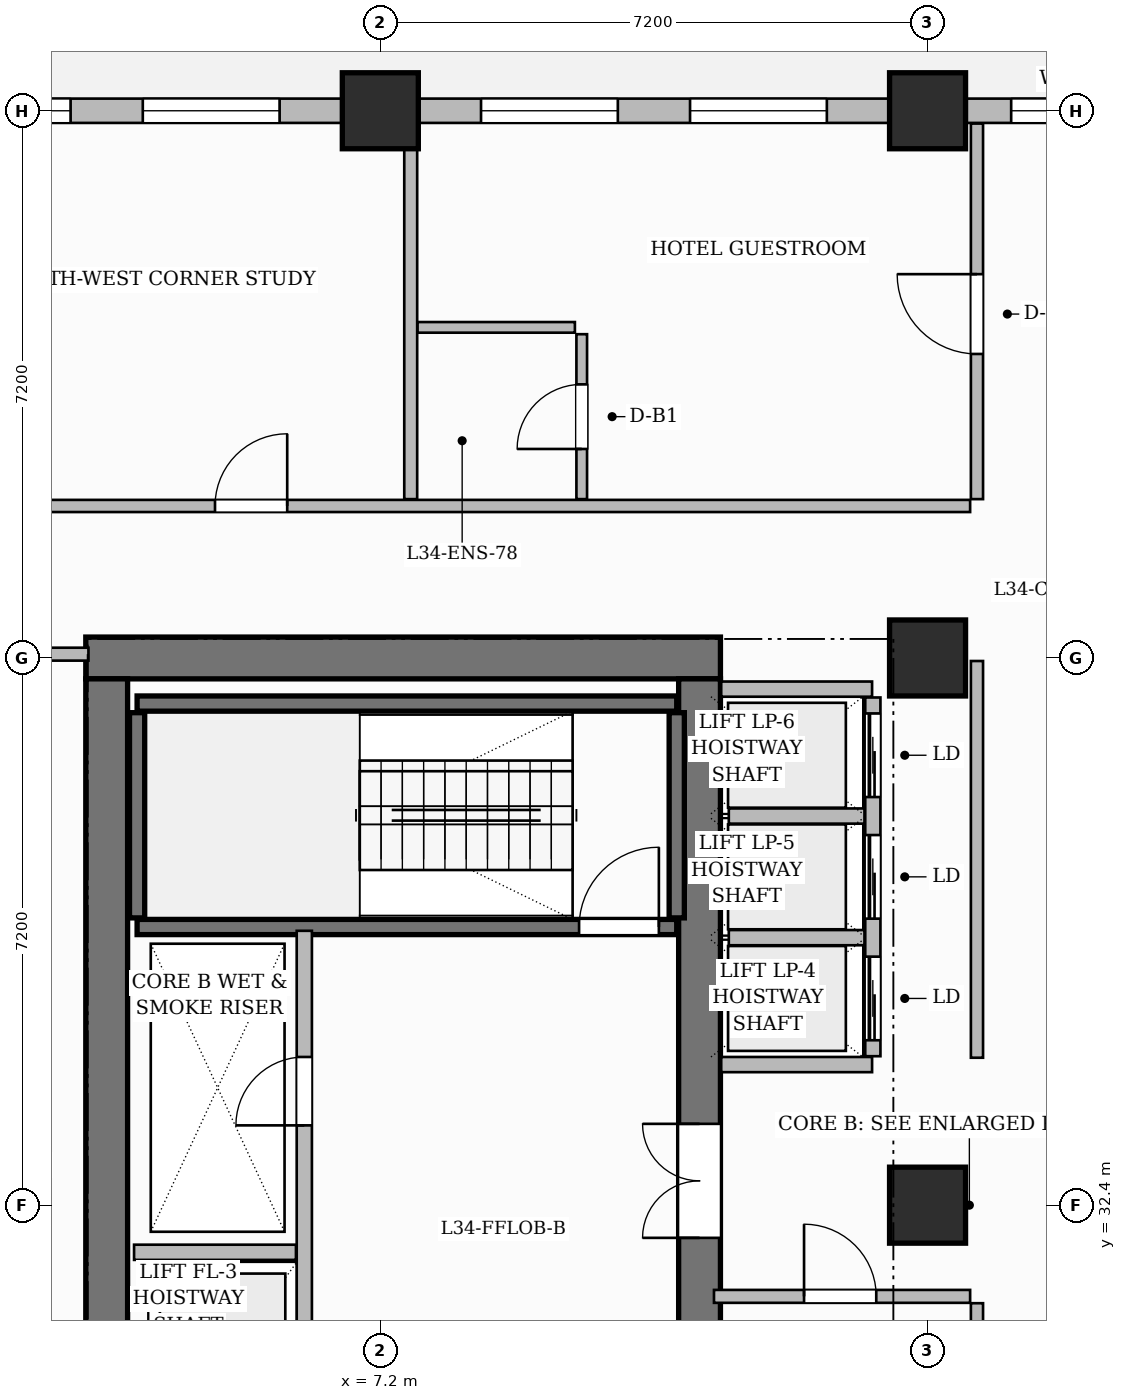
"""IFC4 building model, lengths in metres.
Left out: names, types, materials, properties, quantities, classifications, styles, units other than length and angle.
Written with IfcOpenShell. Run it as: python <this file> out.ifc"""

import sys

from ifc_helpers import new_model, si_unit, direction, frame, frame_2d, origin, origin_2d, place, context, subcontext, project, spatial, rectangle, extrude, source, transform, mapped, element, fill, save


model = new_model("IFC4")
c1 = context("Model", 3, precision=1e-05, world=origin(), true_north=direction((0.0, 1.0)))
c2 = subcontext(c1, "Body", "Model", "MODEL_VIEW")
j1 = project(units=[si_unit("LENGTHUNIT", "METRE"), si_unit("PLANEANGLEUNIT", "RADIAN")], contexts=[c1])
p1 = place(None, origin())
s1 = spatial("IfcSite", under=j1, at=p1, CompositionType="ELEMENT")
p2 = place(p1, origin())
s2 = spatial("IfcBuilding", under=s1, at=p2, CompositionType="ELEMENT")
p3 = place(p2, frame((0.0, 0.0, 137.7)))
s3 = spatial("IfcBuildingStorey", under=s2, at=p3, CompositionType="ELEMENT", Elevation=137.7)
p4 = place(p3, frame((3.325, 39.6, 0.0), z_axis=(0.0, 0.0, 1.0), x_axis=(1.0, 0.0, 0.0)))
e1 = element("IfcWall", 1, at=p4, inside=s3, PredefinedType="SHEAR", context=c2, shape_type="SweptSolid", body=[
    extrude(rectangle(XDim=8.35, YDim=0.55, at=frame_2d((4.175, 0.0))), origin(), (0.0, 0.0, 1.0), 3.7),
])
p5 = place(p3, frame((3.6, 25.475, 0.0), z_axis=(0.0, 0.0, 1.0), x_axis=(0.0, 1.0, 0.0)))
e2 = element("IfcWall", 2, at=p5, inside=s3, PredefinedType="SHEAR", context=c2, shape_type="SweptSolid", body=[
    extrude(rectangle(XDim=13.85, YDim=0.55, at=frame_2d((6.925, 0.0))), origin(), (0.0, 0.0, 1.0), 3.7),
])
p6 = place(p3, frame((11.4, 25.475, 0.0), z_axis=(0.0, 0.0, 1.0), x_axis=(0.0, 1.0, 0.0)))
e3 = element("IfcWall", 3, at=p6, inside=s3, PredefinedType="SHEAR", context=c2, shape_type="SweptSolid", body=[
    extrude(rectangle(XDim=13.85, YDim=0.55, at=frame_2d((6.925, 0.0))), origin(), (0.0, 0.0, 1.0), 3.7),
])
p7 = place(p6, frame((6.495, 0.0, 0.0)))
e4 = element("IfcOpeningElement", 4, at=p7, cuts=e3, PredefinedType="OPENING", context=c2, shape_type="SweptSolid", body=[
    extrude(rectangle(XDim=1.5, YDim=2.2, at=frame_2d((0.75, 1.1))), frame((0.0, 0.285, 0.0), z_axis=(0.0, -1.0, 0.0), x_axis=(1.0, 0.0, 0.0)), (0.0, 0.0, 1.0), 0.57),
])
m1 = source(origin(), c2, "Body", "SweptSolid", [
    extrude(rectangle(XDim=1.0, YDim=1.0, at=origin_2d()), origin(), (0.0, 0.0, 1.0), 3.7),
])
for number, where, z_axis, x_axis in (
    (5, (7.2, 46.8, 0.0), (0.0, 0.0, 1.0), (1.0, 0.0, 0.0)),
    (6, (14.4, 32.4, 0.0), (0.0, 0.0, 1.0), (1.0, 0.0, 0.0)),
    (7, (14.4, 39.6, 0.0), (0.0, 0.0, 1.0), (1.0, 0.0, 0.0)),
    (8, (14.4, 46.8, 0.0), (0.0, 0.0, 1.0), (1.0, 0.0, 0.0)),
):
    element("IfcColumn", number, at=place(p3, frame(where, z_axis=z_axis, x_axis=x_axis)), inside=s3, PredefinedType="COLUMN", context=c2, shape_type="MappedRepresentation", body=[
        mapped(m1, transform((0.0, 0.0, 0.0), scale=1.0)),
    ])
p8 = place(p3, frame((4.0, 39.0, 0.0), z_axis=(0.0, 0.0, 1.0), x_axis=(1.0, 0.0, 0.0)))
e9 = element("IfcWall", 9, at=p8, inside=s3, PredefinedType="SHEAR", context=c2, shape_type="SweptSolid", body=[
    extrude(rectangle(XDim=7.1, YDim=0.2, at=frame_2d((3.55, 0.0))), origin(), (0.0, 0.0, 1.0), 3.7),
])
for number, where, z_axis, x_axis in (
    (10, (4.0, 36.18, 0.0), (0.0, 0.0, 1.0), (0.0, 1.0, 0.0)),
    (11, (11.1, 36.18, 0.0), (0.0, 0.0, 1.0), (0.0, 1.0, 0.0)),
):
    element("IfcWall", number, at=place(p3, frame(where, z_axis=z_axis, x_axis=x_axis)), inside=s3, PredefinedType="SHEAR", context=c2, shape_type="SweptSolid", body=[
        extrude(rectangle(XDim=2.7, YDim=0.2, at=frame_2d((1.35, 0.0))), origin(), (0.0, 0.0, 1.0), 3.7),
    ])
p9 = place(p3, frame((4.0, 36.06, 0.0), z_axis=(0.0, 0.0, 1.0), x_axis=(1.0, 0.0, 0.0)))
e12 = element("IfcWall", 12, at=p9, inside=s3, PredefinedType="SHEAR", context=c2, shape_type="SweptSolid", body=[
    extrude(rectangle(XDim=7.1, YDim=0.2, at=frame_2d((3.55, 0.0))), origin(), (0.0, 0.0, 1.0), 3.7),
])
p10 = place(p9, frame((5.815, 0.0, 0.0)))
e13 = element("IfcOpeningElement", 13, at=p10, cuts=e12, PredefinedType="OPENING", context=c2, shape_type="SweptSolid", body=[
    extrude(rectangle(XDim=1.05, YDim=2.2, at=frame_2d((0.525, 1.1))), frame((0.0, 0.11, 0.0), z_axis=(0.0, -1.0, 0.0), x_axis=(1.0, 0.0, 0.0)), (0.0, 0.0, 1.0), 0.22),
])
p11 = place(p3, frame((6.2, 28.79, 0.0), z_axis=(0.0, 0.0, 1.0), x_axis=(0.0, 1.0, 0.0)))
e14 = element("IfcWall", 14, at=p11, inside=s3, PredefinedType="PARTITIONING", context=c2, shape_type="SweptSolid", body=[
    extrude(rectangle(XDim=7.22, YDim=0.2, at=frame_2d((3.61, 0.0))), origin(), (0.0, 0.0, 1.0), 3.45),
])
p12 = place(p11, frame((4.66, 0.0, 0.0)))
e15 = element("IfcOpeningElement", 15, at=p12, cuts=e14, PredefinedType="OPENING", context=c2, shape_type="SweptSolid", body=[
    extrude(rectangle(XDim=0.9, YDim=2.1, at=frame_2d((0.45, 1.05))), frame((0.0, 0.11, 0.0), z_axis=(0.0, -1.0, 0.0), x_axis=(1.0, 0.0, 0.0)), (0.0, 0.0, 1.0), 0.22),
])
p13 = place(p11, frame((0.96, 0.0, 0.0)))
e16 = element("IfcOpeningElement", 16, at=p13, cuts=e14, PredefinedType="OPENING", context=c2, shape_type="SweptSolid", body=[
    extrude(rectangle(XDim=1.1, YDim=2.2, at=frame_2d((0.55, 1.1))), frame((0.0, 0.11, 0.0), z_axis=(0.0, -1.0, 0.0), x_axis=(1.0, 0.0, 0.0)), (0.0, 0.0, 1.0), 0.22),
])
p14 = place(p3, frame((3.96, 31.78, 0.0), z_axis=(0.0, 0.0, 1.0), x_axis=(1.0, 0.0, 0.0)))
e17 = element("IfcWall", 17, at=p14, inside=s3, PredefinedType="PARTITIONING", context=c2, shape_type="SweptSolid", body=[
    extrude(rectangle(XDim=2.13, YDim=0.2, at=frame_2d((1.065, 0.0))), origin(), (0.0, 0.0, 1.0), 3.45),
])
for number, where, z_axis, x_axis in (
    (18, (11.685, 34.25, 0.0), (0.0, 0.0, 1.0), (1.0, 0.0, 0.0)),
    (19, (11.685, 39.19, 0.0), (0.0, 0.0, 1.0), (1.0, 0.0, 0.0)),
):
    element("IfcWall", number, at=place(p3, frame(where, z_axis=z_axis, x_axis=x_axis)), inside=s3, PredefinedType="PARTITIONING", context=c2, shape_type="SweptSolid", body=[
        extrude(rectangle(XDim=1.985, YDim=0.2, at=frame_2d((0.992, 0.0))), origin(), (0.0, 0.0, 1.0), 3.45),
    ])
p15 = place(p3, frame((13.68, 34.36, 0.0), z_axis=(0.0, 0.0, 1.0), x_axis=(0.0, 1.0, 0.0)))
e20 = element("IfcWall", 20, at=p15, inside=s3, PredefinedType="PARTITIONING", context=c2, shape_type="SweptSolid", body=[
    extrude(rectangle(XDim=4.72, YDim=0.2, at=frame_2d((2.36, 0.0))), origin(), (0.0, 0.0, 1.0), 3.45),
])
p16 = place(p15, frame((0.21, 0.0, 0.0)))
e21 = element("IfcOpeningElement", 21, at=p16, cuts=e20, PredefinedType="OPENING", context=c2, shape_type="SweptSolid", body=[
    extrude(rectangle(XDim=1.1, YDim=2.2, at=frame_2d((0.55, 1.1))), frame((0.0, 0.11, 0.0), z_axis=(0.0, -1.0, 0.0), x_axis=(1.0, 0.0, 0.0)), (0.0, 0.0, 1.0), 0.22),
])
p17 = place(p15, frame((1.81, 0.0, 0.0)))
e22 = element("IfcOpeningElement", 22, at=p17, cuts=e20, PredefinedType="OPENING", context=c2, shape_type="SweptSolid", body=[
    extrude(rectangle(XDim=1.1, YDim=2.2, at=frame_2d((0.55, 1.1))), frame((0.0, 0.11, 0.0), z_axis=(0.0, -1.0, 0.0), x_axis=(1.0, 0.0, 0.0)), (0.0, 0.0, 1.0), 0.22),
])
p18 = place(p15, frame((3.41, 0.0, 0.0)))
e23 = element("IfcOpeningElement", 23, at=p18, cuts=e20, PredefinedType="OPENING", context=c2, shape_type="SweptSolid", body=[
    extrude(rectangle(XDim=1.1, YDim=2.2, at=frame_2d((0.55, 1.1))), frame((0.0, 0.11, 0.0), z_axis=(0.0, -1.0, 0.0), x_axis=(1.0, 0.0, 0.0)), (0.0, 0.0, 1.0), 0.22),
])
for number, where, z_axis, x_axis in (
    (24, (11.785, 35.92, 0.0), (0.0, 0.0, 1.0), (1.0, 0.0, 0.0)),
    (25, (11.785, 37.52, 0.0), (0.0, 0.0, 1.0), (1.0, 0.0, 0.0)),
):
    element("IfcWall", number, at=place(p3, frame(where, z_axis=z_axis, x_axis=x_axis)), inside=s3, PredefinedType="PARTITIONING", context=c2, shape_type="SweptSolid", body=[
        extrude(rectangle(XDim=1.785, YDim=0.2, at=frame_2d((0.893, 0.0))), origin(), (0.0, 0.0, 1.0), 3.45),
    ])
p19 = place(p3, frame((0.24, 39.65, 0.0), z_axis=(0.0, 0.0, 1.0), x_axis=(1.0, 0.0, 0.0)))
e26 = element("IfcWall", 26, at=p19, inside=s3, PredefinedType="PARTITIONING", context=c2, shape_type="SweptSolid", body=[
    extrude(rectangle(XDim=3.12, YDim=0.17, at=frame_2d((1.56, 0.0))), origin(), (0.0, 0.0, 1.0), 3.45),
])
p20 = place(p19, frame((1.11, 0.0, 0.0)))
e27 = element("IfcOpeningElement", 27, at=p20, cuts=e26, PredefinedType="OPENING", context=c2, shape_type="SweptSolid", body=[
    extrude(rectangle(XDim=0.9, YDim=2.15, at=frame_2d((0.45, 1.075))), frame((0.0, 0.095, 0.0), z_axis=(0.0, -1.0, 0.0), x_axis=(1.0, 0.0, 0.0)), (0.0, 0.0, 1.0), 0.19),
])
p21 = place(p3, frame((15.05, 34.34, 0.0), z_axis=(0.0, 0.0, 1.0), x_axis=(0.0, 1.0, 0.0)))
e28 = element("IfcWall", 28, at=p21, inside=s3, PredefinedType="PARTITIONING", context=c2, shape_type="SweptSolid", body=[
    extrude(rectangle(XDim=5.22, YDim=0.16, at=frame_2d((2.61, 0.0))), origin(), (0.0, 0.0, 1.0), 3.45),
])
p22 = place(p3, frame((15.05, 41.69, 0.0), z_axis=(0.0, 0.0, 1.0), x_axis=(0.0, 1.0, 0.0)))
e29 = element("IfcWall", 29, at=p22, inside=s3, PredefinedType="PARTITIONING", context=c2, shape_type="SweptSolid", body=[
    extrude(rectangle(XDim=4.942, YDim=0.16, at=frame_2d((2.471, 0.0))), origin(), (0.0, 0.0, 1.0), 3.45),
])
p23 = place(p22, frame((1.91, 0.0, 0.0)))
e30 = element("IfcOpeningElement", 30, at=p23, cuts=e29, PredefinedType="OPENING", context=c2, shape_type="SweptSolid", body=[
    extrude(rectangle(XDim=1.05, YDim=2.25, at=frame_2d((0.525, 1.125))), frame((0.0, 0.09, 0.0), z_axis=(0.0, -1.0, 0.0), x_axis=(1.0, 0.0, 0.0)), (0.0, 0.0, 1.0), 0.18),
])
p24 = place(p3, frame((7.6, 41.69, 0.0), z_axis=(0.0, 0.0, 1.0), x_axis=(0.0, 1.0, 0.0)))
e31 = element("IfcWall", 31, at=p24, inside=s3, PredefinedType="PARTITIONING", context=c2, shape_type="SweptSolid", body=[
    extrude(rectangle(XDim=4.87, YDim=0.17, at=frame_2d((2.435, 0.0))), origin(), (0.0, 0.0, 1.0), 3.45),
])
p25 = place(p3, frame((0.168, 41.6, 0.0), z_axis=(0.0, 0.0, 1.0), x_axis=(1.0, 0.0, 0.0)))
e32 = element("IfcWall", 32, at=p25, inside=s3, PredefinedType="PARTITIONING", context=c2, shape_type="SweptSolid", body=[
    extrude(rectangle(XDim=14.792, YDim=0.16, at=frame_2d((7.396, 0.0))), origin(), (0.0, 0.0, 1.0), 2.935),
])
p26 = place(p25, frame((4.857, 0.0, 0.0)))
e33 = element("IfcOpeningElement", 33, at=p26, cuts=e32, PredefinedType="OPENING", context=c2, shape_type="SweptSolid", body=[
    extrude(rectangle(XDim=0.95, YDim=2.15, at=frame_2d((0.475, 1.075))), frame((0.0, 0.09, 0.0), z_axis=(0.0, -1.0, 0.0), x_axis=(1.0, 0.0, 0.0)), (0.0, 0.0, 1.0), 0.18),
])
p27 = place(p3, frame((7.69, 43.95, 0.0), z_axis=(0.0, 0.0, 1.0), x_axis=(1.0, 0.0, 0.0)))
e34 = element("IfcWall", 34, at=p27, inside=s3, PredefinedType="PARTITIONING", context=c2, shape_type="SweptSolid", body=[
    extrude(rectangle(XDim=2.07, YDim=0.14, at=frame_2d((1.035, 0.0))), origin(), (0.0, 0.0, 1.0), 2.935),
])
p28 = place(p3, frame((9.85, 41.69, 0.0), z_axis=(0.0, 0.0, 1.0), x_axis=(0.0, 1.0, 0.0)))
e35 = element("IfcWall", 35, at=p28, inside=s3, PredefinedType="PARTITIONING", context=c2, shape_type="SweptSolid", body=[
    extrude(rectangle(XDim=2.17, YDim=0.14, at=frame_2d((1.085, 0.0))), origin(), (0.0, 0.0, 1.0), 3.45),
])
p29 = place(p28, frame((0.66, 0.0, 0.0)))
e36 = element("IfcOpeningElement", 36, at=p29, cuts=e35, PredefinedType="OPENING", context=c2, shape_type="SweptSolid", body=[
    extrude(rectangle(XDim=0.85, YDim=2.1, at=frame_2d((0.425, 1.05))), frame((0.0, 0.08, 0.0), z_axis=(0.0, -1.0, 0.0), x_axis=(1.0, 0.0, 0.0)), (0.0, 0.0, 1.0), 0.16),
])
p30 = place(p3, frame((15.05, 25.39, 0.0), z_axis=(0.0, 0.0, 1.0), x_axis=(0.0, 1.0, 0.0)))
e37 = element("IfcWall", 37, at=p30, inside=s3, PredefinedType="PARTITIONING", context=c2, shape_type="SweptSolid", body=[
    extrude(rectangle(XDim=5.72, YDim=0.16, at=frame_2d((2.86, 0.0))), origin(), (0.0, 0.0, 1.0), 3.45),
])
p31 = place(p3, frame((11.59, 31.2, 0.0), z_axis=(0.0, 0.0, 1.0), x_axis=(1.0, 0.0, 0.0)))
e38 = element("IfcWall", 38, at=p31, inside=s3, PredefinedType="PARTITIONING", context=c2, shape_type="SweptSolid", body=[
    extrude(rectangle(XDim=3.37, YDim=0.17, at=frame_2d((1.685, 0.0))), origin(), (0.0, 0.0, 1.0), 3.45),
])
p32 = place(p31, frame((1.185, 0.0, 0.0)))
e39 = element("IfcOpeningElement", 39, at=p32, cuts=e38, PredefinedType="OPENING", context=c2, shape_type="SweptSolid", body=[
    extrude(rectangle(XDim=0.95, YDim=2.15, at=frame_2d((0.475, 1.075))), frame((0.0, 0.095, 0.0), z_axis=(0.0, -1.0, 0.0), x_axis=(1.0, 0.0, 0.0)), (0.0, 0.0, 1.0), 0.19),
])
p33 = place(p3, frame((0.0, 46.8, 0.0), z_axis=(0.0, 0.0, 1.0), x_axis=(1.0, 0.0, 0.0)))
e40 = element("IfcWall", 40, at=p33, inside=s3, PredefinedType="SOLIDWALL", context=c2, shape_type="SweptSolid", body=[
    extrude(rectangle(XDim=18.0, YDim=0.32, at=frame_2d((9.0, 0.0))), origin(), (0.0, 0.0, 1.0), 2.935),
])
p34 = place(p33, frame((1.325, 0.0, 0.8)))
e41 = element("IfcOpeningElement", 41, at=p34, cuts=e40, PredefinedType="OPENING", context=c2, shape_type="SweptSolid", body=[
    extrude(rectangle(XDim=1.8, YDim=1.85, at=frame_2d((0.9, 0.925))), frame((0.0, 0.17, 0.0), z_axis=(0.0, -1.0, 0.0), x_axis=(1.0, 0.0, 0.0)), (0.0, 0.0, 1.0), 0.34),
])
p35 = place(p33, frame((4.075, 0.0, 0.8)))
e42 = element("IfcOpeningElement", 42, at=p35, cuts=e40, PredefinedType="OPENING", context=c2, shape_type="SweptSolid", body=[
    extrude(rectangle(XDim=1.8, YDim=1.85, at=frame_2d((0.9, 0.925))), frame((0.0, 0.17, 0.0), z_axis=(0.0, -1.0, 0.0), x_axis=(1.0, 0.0, 0.0)), (0.0, 0.0, 1.0), 0.34),
])
p36 = place(p33, frame((8.525, 0.0, 0.8)))
e43 = element("IfcOpeningElement", 43, at=p36, cuts=e40, PredefinedType="OPENING", context=c2, shape_type="SweptSolid", body=[
    extrude(rectangle(XDim=1.8, YDim=1.85, at=frame_2d((0.9, 0.925))), frame((0.0, 0.17, 0.0), z_axis=(0.0, -1.0, 0.0), x_axis=(1.0, 0.0, 0.0)), (0.0, 0.0, 1.0), 0.34),
])
p37 = place(p33, frame((11.275, 0.0, 0.8)))
e44 = element("IfcOpeningElement", 44, at=p37, cuts=e40, PredefinedType="OPENING", context=c2, shape_type="SweptSolid", body=[
    extrude(rectangle(XDim=1.8, YDim=1.85, at=frame_2d((0.9, 0.925))), frame((0.0, 0.17, 0.0), z_axis=(0.0, -1.0, 0.0), x_axis=(1.0, 0.0, 0.0)), (0.0, 0.0, 1.0), 0.34),
])
p38 = place(p33, frame((15.5, 0.0, 0.8)))
e45 = element("IfcOpeningElement", 45, at=p38, cuts=e40, PredefinedType="OPENING", context=c2, shape_type="SweptSolid", body=[
    extrude(rectangle(XDim=1.4, YDim=1.85, at=frame_2d((0.7, 0.925))), frame((0.0, 0.17, 0.0), z_axis=(0.0, -1.0, 0.0), x_axis=(1.0, 0.0, 0.0)), (0.0, 0.0, 1.0), 0.34),
])
m2 = source(origin(), c2, "Body", "SweptSolid", [
    extrude(rectangle(XDim=1.05, YDim=2.2, at=frame_2d((0.525, 1.1))), frame((0.0, 0.025, 0.0), z_axis=(0.0, -1.0, 0.0), x_axis=(1.0, 0.0, 0.0)), (0.0, 0.0, 1.0), 0.05),
])
p39 = place(p10, origin())
e46 = element("IfcDoor", 46, at=p39, inside=s3, OperationType="SINGLE_SWING_RIGHT", PredefinedType="DOOR", context=c2, shape_type="MappedRepresentation", body=[
    mapped(m2, transform((0.0, 0.0, 0.0), scale=1.0)),
])
fill(e13, e46)
m3 = source(origin(), c2, "Body", "SweptSolid", [
    extrude(rectangle(XDim=0.9, YDim=2.1, at=frame_2d((0.45, 1.05))), frame((0.0, 0.025, 0.0), z_axis=(0.0, -1.0, 0.0), x_axis=(1.0, 0.0, 0.0)), (0.0, 0.0, 1.0), 0.05),
])
p40 = place(p12, origin())
e47 = element("IfcDoor", 47, at=p40, inside=s3, OperationType="SINGLE_SWING_LEFT", PredefinedType="DOOR", context=c2, shape_type="MappedRepresentation", body=[
    mapped(m3, transform((0.0, 0.0, 0.0), scale=1.0)),
])
fill(e15, e47)
m4 = source(origin(), c2, "Body", "SweptSolid", [
    extrude(rectangle(XDim=1.5, YDim=2.2, at=frame_2d((0.75, 1.1))), frame((0.0, 0.025, 0.0), z_axis=(0.0, -1.0, 0.0), x_axis=(1.0, 0.0, 0.0)), (0.0, 0.0, 1.0), 0.05),
])
p41 = place(p7, origin())
e48 = element("IfcDoor", 48, at=p41, inside=s3, OperationType="DOUBLE_DOOR_SINGLE_SWING", PredefinedType="DOOR", context=c2, shape_type="MappedRepresentation", body=[
    mapped(m4, transform((0.0, 0.0, 0.0), scale=1.0)),
])
fill(e4, e48)
m5 = source(origin(), c2, "Body", "SweptSolid", [
    extrude(rectangle(XDim=0.95, YDim=2.15, at=frame_2d((0.475, 1.075))), frame((0.0, 0.025, 0.0), z_axis=(0.0, -1.0, 0.0), x_axis=(1.0, 0.0, 0.0)), (0.0, 0.0, 1.0), 0.05),
])
p42 = place(p26, origin())
e49 = element("IfcDoor", 49, at=p42, inside=s3, OperationType="SINGLE_SWING_RIGHT", PredefinedType="DOOR", context=c2, shape_type="MappedRepresentation", body=[
    mapped(m5, transform((0.0, 0.0, 0.0), scale=1.0)),
])
fill(e33, e49)
m6 = source(origin(), c2, "Body", "SweptSolid", [
    extrude(rectangle(XDim=0.85, YDim=2.1, at=frame_2d((0.425, 1.05))), frame((0.0, 0.025, 0.0), z_axis=(0.0, -1.0, 0.0), x_axis=(1.0, 0.0, 0.0)), (0.0, 0.0, 1.0), 0.05),
])
p43 = place(p29, origin())
e50 = element("IfcDoor", 50, at=p43, inside=s3, OperationType="SINGLE_SWING_LEFT", PredefinedType="DOOR", context=c2, shape_type="MappedRepresentation", body=[
    mapped(m6, transform((0.0, 0.0, 0.0), scale=1.0)),
])
fill(e36, e50)
m7 = source(origin(), c2, "Body", "SweptSolid", [
    extrude(rectangle(XDim=1.05, YDim=2.25, at=frame_2d((0.525, 1.125))), frame((0.0, 0.025, 0.0), z_axis=(0.0, -1.0, 0.0), x_axis=(1.0, 0.0, 0.0)), (0.0, 0.0, 1.0), 0.05),
])
p44 = place(p23, origin())
e51 = element("IfcDoor", 51, at=p44, inside=s3, OperationType="SINGLE_SWING_RIGHT", PredefinedType="DOOR", context=c2, shape_type="MappedRepresentation", body=[
    mapped(m7, transform((0.0, 0.0, 0.0), scale=1.0)),
])
fill(e30, e51)
p45 = place(p32, origin())
e52 = element("IfcDoor", 52, at=p45, inside=s3, OperationType="SINGLE_SWING_LEFT", PredefinedType="DOOR", context=c2, shape_type="MappedRepresentation", body=[
    mapped(m5, transform((0.0, 0.0, 0.0), scale=1.0)),
])
fill(e39, e52)
m8 = source(origin(), c2, "Body", "SweptSolid", [
    extrude(rectangle(XDim=1.1, YDim=2.2, at=frame_2d((0.55, 1.1))), frame((0.0, 0.025, 0.0), z_axis=(0.0, -1.0, 0.0), x_axis=(1.0, 0.0, 0.0)), (0.0, 0.0, 1.0), 0.05),
])
p46 = place(p16, origin())
e53 = element("IfcDoor", 53, at=p46, inside=s3, OperationType="SLIDING_TO_LEFT", PredefinedType="DOOR", context=c2, shape_type="MappedRepresentation", body=[
    mapped(m8, transform((0.0, 0.0, 0.0), scale=1.0)),
])
fill(e21, e53)
p47 = place(p17, origin())
e54 = element("IfcDoor", 54, at=p47, inside=s3, OperationType="SLIDING_TO_LEFT", PredefinedType="DOOR", context=c2, shape_type="MappedRepresentation", body=[
    mapped(m8, transform((0.0, 0.0, 0.0), scale=1.0)),
])
fill(e22, e54)
p48 = place(p18, origin())
e55 = element("IfcDoor", 55, at=p48, inside=s3, OperationType="SLIDING_TO_LEFT", PredefinedType="DOOR", context=c2, shape_type="MappedRepresentation", body=[
    mapped(m8, transform((0.0, 0.0, 0.0), scale=1.0)),
])
fill(e23, e55)
m9 = source(origin(), c2, "Body", "SweptSolid", [
    extrude(rectangle(XDim=1.8, YDim=1.85, at=frame_2d((0.9, 0.925))), frame((0.0, 0.03, 0.0), z_axis=(0.0, -1.0, 0.0), x_axis=(1.0, 0.0, 0.0)), (0.0, 0.0, 1.0), 0.06),
])
p49 = place(p34, origin())
e56 = element("IfcWindow", 56, at=p49, inside=s3, PartitioningType="DOUBLE_PANEL_VERTICAL", PredefinedType="WINDOW", context=c2, shape_type="MappedRepresentation", body=[
    mapped(m9, transform((0.0, 0.0, 0.0), scale=1.0)),
])
fill(e41, e56)
p50 = place(p35, origin())
e57 = element("IfcWindow", 57, at=p50, inside=s3, PartitioningType="DOUBLE_PANEL_VERTICAL", PredefinedType="WINDOW", context=c2, shape_type="MappedRepresentation", body=[
    mapped(m9, transform((0.0, 0.0, 0.0), scale=1.0)),
])
fill(e42, e57)
p51 = place(p36, origin())
e58 = element("IfcWindow", 58, at=p51, inside=s3, PartitioningType="DOUBLE_PANEL_VERTICAL", PredefinedType="WINDOW", context=c2, shape_type="MappedRepresentation", body=[
    mapped(m9, transform((0.0, 0.0, 0.0), scale=1.0)),
])
fill(e43, e58)
p52 = place(p37, origin())
e59 = element("IfcWindow", 59, at=p52, inside=s3, PartitioningType="DOUBLE_PANEL_VERTICAL", PredefinedType="WINDOW", context=c2, shape_type="MappedRepresentation", body=[
    mapped(m9, transform((0.0, 0.0, 0.0), scale=1.0)),
])
fill(e44, e59)
m10 = source(origin(), c2, "Body", "SweptSolid", [
    extrude(rectangle(XDim=1.4, YDim=1.85, at=frame_2d((0.7, 0.925))), frame((0.0, 0.03, 0.0), z_axis=(0.0, -1.0, 0.0), x_axis=(1.0, 0.0, 0.0)), (0.0, 0.0, 1.0), 0.06),
])
p53 = place(p38, origin())
e60 = element("IfcWindow", 60, at=p53, inside=s3, PartitioningType="SINGLE_PANEL", PredefinedType="WINDOW", context=c2, shape_type="MappedRepresentation", body=[
    mapped(m10, transform((0.0, 0.0, 0.0), scale=1.0)),
])
fill(e45, e60)
save(model, sys.argv[1])
